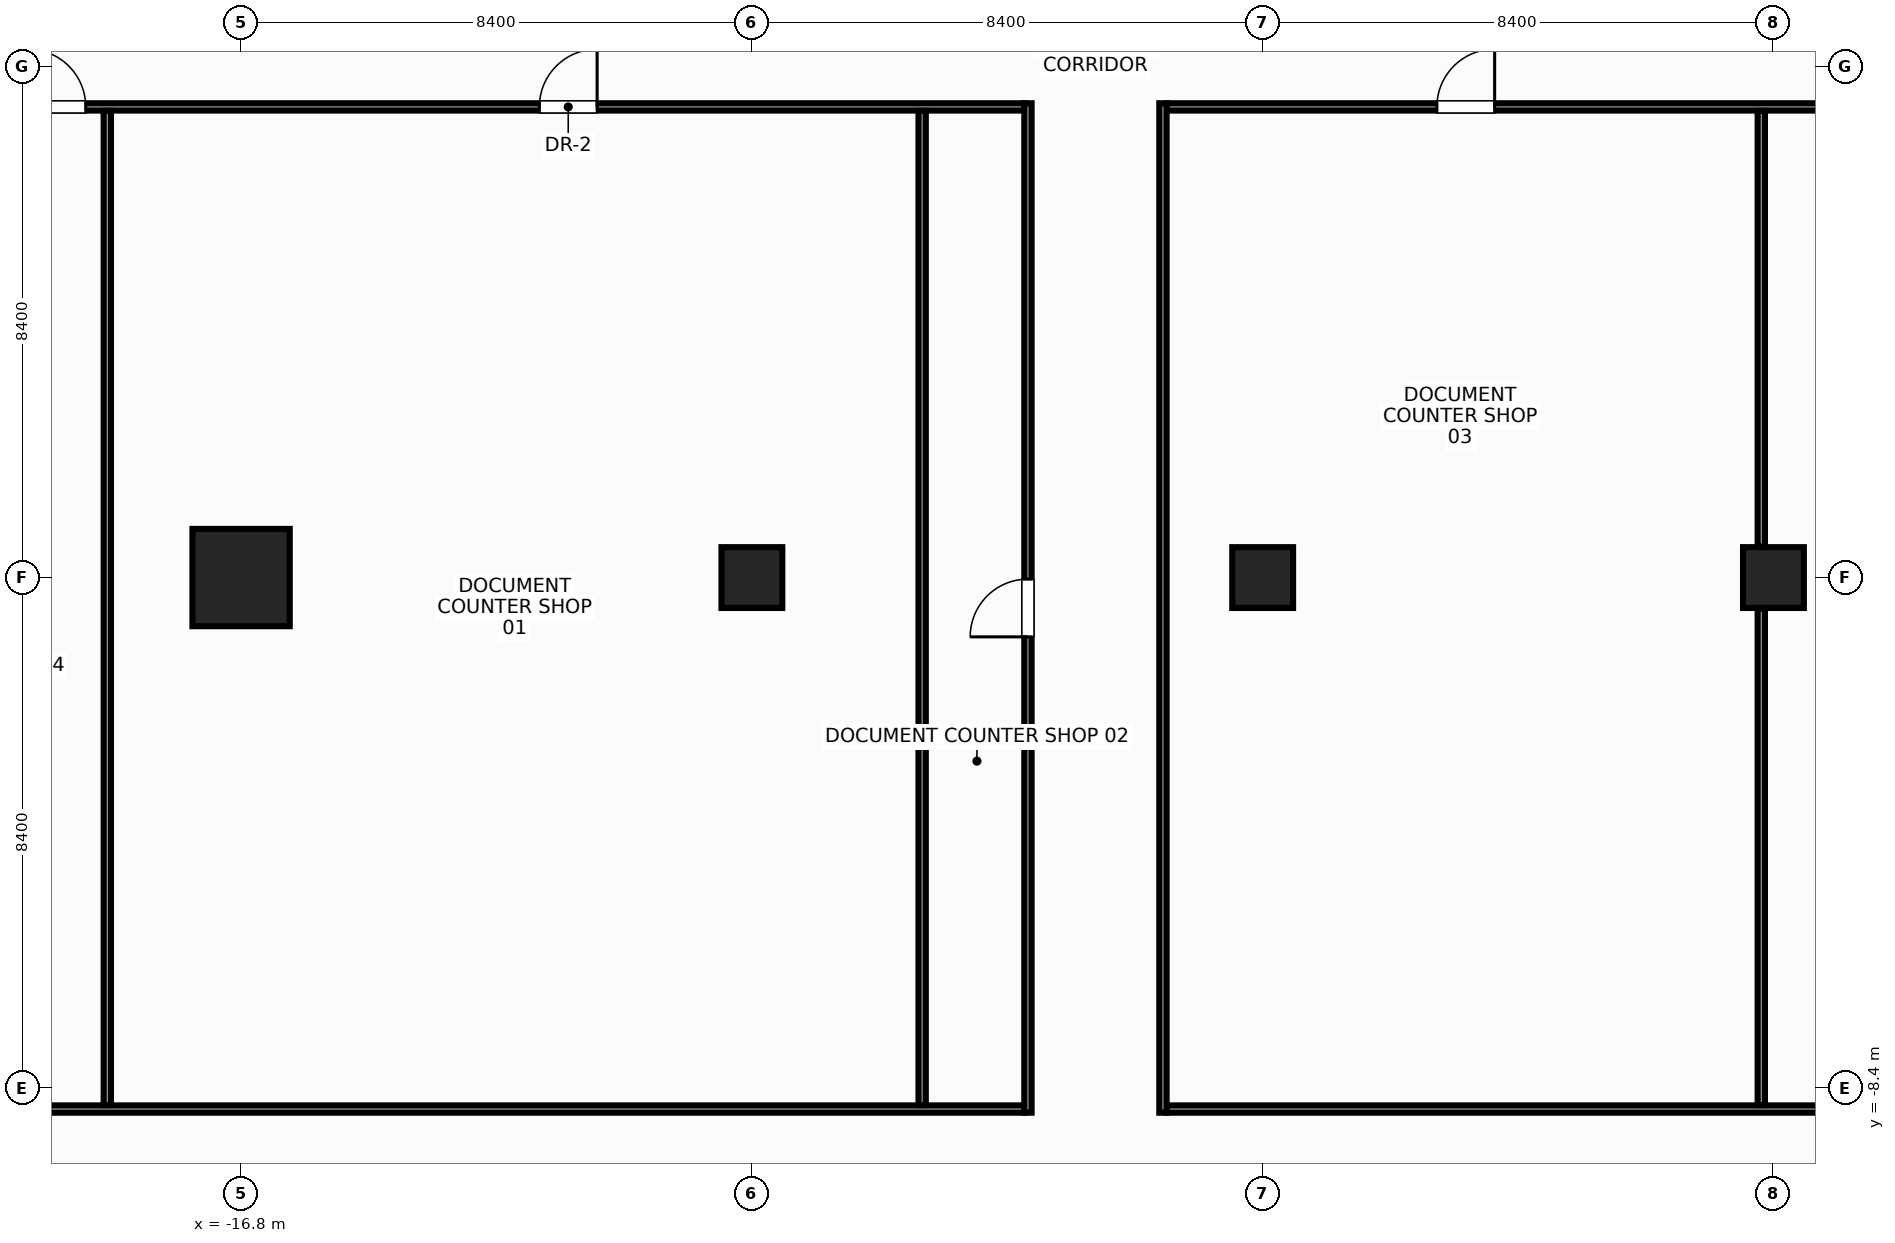
"""IFC4 building model, lengths in metres.
Left out: names, types, materials, properties, quantities, classifications, styles, units other than length and angle.
Written with IfcOpenShell. Run it as: python <this file> out.ifc"""

import sys

from ifc_helpers import new_model, si_unit, direction, frame, frame_2d, origin, origin_with_axes, origin_2d, place, context, subcontext, project, spatial, rectangle, hollow_rectangle, extrude, source, transform, mapped, element, fill, save


model = new_model("IFC4")
c1 = context("Model", 3, precision=1e-05, world=origin(), true_north=direction((0.0, 1.0)))
c2 = subcontext(c1, "Body", "Model", "MODEL_VIEW")
j1 = project(units=[si_unit("LENGTHUNIT", "METRE"), si_unit("PLANEANGLEUNIT", "RADIAN")], contexts=[c1])
p1 = place(None, origin())
s1 = spatial("IfcSite", under=j1, at=p1, CompositionType="ELEMENT")
p2 = place(p1, origin())
s2 = spatial("IfcBuilding", under=s1, at=p2, CompositionType="ELEMENT")
p3 = place(p2, frame((0.0, 0.0, 84.8)))
s3 = spatial("IfcBuildingStorey", under=s2, at=p3, CompositionType="ELEMENT", Elevation=84.8)
m1 = source(origin(), c2, "Body", "SweptSolid", [
    extrude(rectangle(XDim=1.6, YDim=1.6, at=origin_2d()), origin(), (0.0, 0.0, 1.0), 3.6),
])
p4 = place(p3, frame((-16.8, 0.0, 0.0), z_axis=(0.0, 0.0, 1.0), x_axis=(1.0, 0.0, 0.0)))
e1 = element("IfcColumn", 1, at=p4, inside=s3, PredefinedType="COLUMN", context=c2, shape_type="MappedRepresentation", body=[
    mapped(m1, transform((0.0, 0.0, 0.0), x_axis=(1.0, 0.0, 0.0), y_axis=(0.0, 1.0, 0.0), z_axis=(0.0, 0.0, 1.0), scale=1.0)),
])
m2 = source(origin(), c2, "Body", "SweptSolid", [
    extrude(hollow_rectangle(XDim=1.0, YDim=1.0, WallThickness=0.045, at=origin_2d()), origin(), (0.0, 0.0, 1.0), 3.6),
])
for number, where, z_axis, x_axis in (
    (2, (-8.4, 0.0, 0.0), (0.0, 0.0, 1.0), (1.0, 0.0, 0.0)),
    (3, (8.4, 0.0, 0.0), (0.0, 0.0, 1.0), (1.0, 0.0, 0.0)),
):
    element("IfcColumn", number, at=place(p3, frame(where, z_axis=z_axis, x_axis=x_axis)), inside=s3, PredefinedType="COLUMN", context=c2, shape_type="MappedRepresentation", body=[
        mapped(m2, transform((0.0, 0.0, 0.0), x_axis=(1.0, 0.0, 0.0), y_axis=(0.0, 1.0, 0.0), z_axis=(0.0, 0.0, 1.0), scale=1.0)),
    ])
m3 = source(origin(), c2, "Body", "SweptSolid", [
    extrude(rectangle(XDim=1.0, YDim=1.0, at=origin_2d()), origin(), (0.0, 0.0, 1.0), 3.6),
])
p5 = place(p3, origin_with_axes())
e4 = element("IfcColumn", 4, at=p5, inside=s3, PredefinedType="COLUMN", context=c2, shape_type="MappedRepresentation", body=[
    mapped(m3, transform((0.0, 0.0, 0.0), x_axis=(1.0, 0.0, 0.0), y_axis=(0.0, 1.0, 0.0), z_axis=(0.0, 0.0, 1.0), scale=1.0)),
])
m4 = source(origin(), c2, "Body", "SweptSolid", [
    extrude(rectangle(XDim=16.8, YDim=0.12, at=frame_2d((8.4, 0.0))), origin(), (0.0, 0.0, 1.0), 2.745),
])
p6 = place(p3, frame((-20.72, 7.74, 0.0), z_axis=(0.0, 0.0, 1.0), x_axis=(1.0, 0.0, 0.0)))
e5 = element("IfcWall", 5, at=p6, inside=s3, PredefinedType="PARTITIONING", context=c2, shape_type="MappedRepresentation", body=[
    mapped(m4, transform((0.0, 0.0, 0.0), x_axis=(1.0, 0.0, 0.0), y_axis=(0.0, 1.0, 0.0), z_axis=(0.0, 0.0, 1.0), scale=1.0)),
])
p7 = place(p6, frame((8.825, 0.0, 0.0)))
e6 = element("IfcOpeningElement", 6, at=p7, cuts=e5, PredefinedType="OPENING", context=c2, shape_type="SweptSolid", body=[
    extrude(rectangle(XDim=0.95, YDim=2.15, at=frame_2d((0.475, 1.075))), frame((0.0, 0.072, 0.0), z_axis=(0.0, -1.0, 0.0), x_axis=(1.0, 0.0, 0.0)), (0.0, 0.0, 1.0), 0.144),
])
p8 = place(p6, frame((0.415, 0.0, 0.0)))
e7 = element("IfcOpeningElement", 7, at=p8, cuts=e5, PredefinedType="OPENING", context=c2, shape_type="SweptSolid", body=[
    extrude(rectangle(XDim=0.95, YDim=2.15, at=frame_2d((0.475, 1.075))), frame((0.0, 0.072, 0.0), z_axis=(0.0, -1.0, 0.0), x_axis=(1.0, 0.0, 0.0)), (0.0, 0.0, 1.0), 0.144),
])
m5 = source(origin(), c2, "Body", "SweptSolid", [
    extrude(rectangle(XDim=22.3, YDim=0.12, at=frame_2d((11.15, 0.0))), origin(), (0.0, 0.0, 1.0), 2.745),
])
p9 = place(p3, frame((-1.58, 7.74, 0.0), z_axis=(0.0, 0.0, 1.0), x_axis=(1.0, 0.0, 0.0)))
e8 = element("IfcWall", 8, at=p9, inside=s3, PredefinedType="PARTITIONING", context=c2, shape_type="MappedRepresentation", body=[
    mapped(m5, transform((0.0, 0.0, 0.0), x_axis=(1.0, 0.0, 0.0), y_axis=(0.0, 1.0, 0.0), z_axis=(0.0, 0.0, 1.0), scale=1.0)),
])
p10 = place(p9, frame((4.445, 0.0, 0.0)))
e9 = element("IfcOpeningElement", 9, at=p10, cuts=e8, PredefinedType="OPENING", context=c2, shape_type="SweptSolid", body=[
    extrude(rectangle(XDim=0.95, YDim=2.15, at=frame_2d((0.475, 1.075))), frame((0.0, 0.072, 0.0), z_axis=(0.0, -1.0, 0.0), x_axis=(1.0, 0.0, 0.0)), (0.0, 0.0, 1.0), 0.144),
])
p11 = place(p9, frame((15.535, 0.0, 0.0)))
e10 = element("IfcOpeningElement", 10, at=p11, cuts=e8, PredefinedType="OPENING", context=c2, shape_type="SweptSolid", body=[
    extrude(rectangle(XDim=0.95, YDim=2.15, at=frame_2d((0.475, 1.075))), frame((0.0, 0.072, 0.0), z_axis=(0.0, -1.0, 0.0), x_axis=(1.0, 0.0, 0.0)), (0.0, 0.0, 1.0), 0.144),
])
p12 = place(p3, frame((-20.72, -8.74, 0.0), z_axis=(0.0, 0.0, 1.0), x_axis=(1.0, 0.0, 0.0)))
e11 = element("IfcWall", 11, at=p12, inside=s3, PredefinedType="PARTITIONING", context=c2, shape_type="MappedRepresentation", body=[
    mapped(m4, transform((0.0, 0.0, 0.0), x_axis=(1.0, 0.0, 0.0), y_axis=(0.0, 1.0, 0.0), z_axis=(0.0, 0.0, 1.0), scale=1.0)),
])
p13 = place(p3, frame((-1.58, -8.74, 0.0), z_axis=(0.0, 0.0, 1.0), x_axis=(1.0, 0.0, 0.0)))
e12 = element("IfcWall", 12, at=p13, inside=s3, PredefinedType="PARTITIONING", context=c2, shape_type="MappedRepresentation", body=[
    mapped(m5, transform((0.0, 0.0, 0.0), x_axis=(1.0, 0.0, 0.0), y_axis=(0.0, 1.0, 0.0), z_axis=(0.0, 0.0, 1.0), scale=1.0)),
])
m6 = source(origin(), c2, "Body", "SweptSolid", [
    extrude(rectangle(XDim=16.6, YDim=0.12, at=frame_2d((8.3, 0.0))), origin(), (0.0, 0.0, 1.0), 2.645),
])
p14 = place(p3, frame((-3.86, -8.8, 0.0), z_axis=(0.0, 0.0, 1.0), x_axis=(0.0, 1.0, 0.0)))
e13 = element("IfcWall", 13, at=p14, inside=s3, PredefinedType="PARTITIONING", context=c2, shape_type="MappedRepresentation", body=[
    mapped(m6, transform((0.0, 0.0, 0.0), x_axis=(1.0, 0.0, 0.0), y_axis=(0.0, 1.0, 0.0), z_axis=(0.0, 0.0, 1.0), scale=1.0)),
])
p15 = place(p14, frame((7.825, 0.0, 0.0)))
e14 = element("IfcOpeningElement", 14, at=p15, cuts=e13, PredefinedType="OPENING", context=c2, shape_type="SweptSolid", body=[
    extrude(rectangle(XDim=0.95, YDim=2.15, at=frame_2d((0.475, 1.075))), frame((0.0, 0.072, 0.0), z_axis=(0.0, -1.0, 0.0), x_axis=(1.0, 0.0, 0.0)), (0.0, 0.0, 1.0), 0.144),
])
p16 = place(p3, frame((-1.64, -8.8, 0.0), z_axis=(0.0, 0.0, 1.0), x_axis=(0.0, 1.0, 0.0)))
e15 = element("IfcWall", 15, at=p16, inside=s3, PredefinedType="PARTITIONING", context=c2, shape_type="MappedRepresentation", body=[
    mapped(m6, transform((0.0, 0.0, 0.0), x_axis=(1.0, 0.0, 0.0), y_axis=(0.0, 1.0, 0.0), z_axis=(0.0, 0.0, 1.0), scale=1.0)),
])
m7 = source(origin(), c2, "Body", "SweptSolid", [
    extrude(rectangle(XDim=16.35, YDim=0.12, at=frame_2d((8.175, 0.0))), origin(), (0.0, 0.0, 1.0), 2.745),
])
p17 = place(p3, frame((-19.0, -8.675, 0.0), z_axis=(0.0, 0.0, 1.0), x_axis=(0.0, 1.0, 0.0)))
e16 = element("IfcWall", 16, at=p17, inside=s3, PredefinedType="PARTITIONING", context=c2, shape_type="MappedRepresentation", body=[
    mapped(m7, transform((0.0, 0.0, 0.0), x_axis=(1.0, 0.0, 0.0), y_axis=(0.0, 1.0, 0.0), z_axis=(0.0, 0.0, 1.0), scale=1.0)),
])
m8 = source(origin(), c2, "Body", "SweptSolid", [
    extrude(rectangle(XDim=16.35, YDim=0.12, at=frame_2d((8.175, 0.0))), origin(), (0.0, 0.0, 1.0), 2.645),
])
p18 = place(p3, frame((-5.6, -8.675, 0.0), z_axis=(0.0, 0.0, 1.0), x_axis=(0.0, 1.0, 0.0)))
e17 = element("IfcWall", 17, at=p18, inside=s3, PredefinedType="PARTITIONING", context=c2, shape_type="MappedRepresentation", body=[
    mapped(m8, transform((0.0, 0.0, 0.0), x_axis=(1.0, 0.0, 0.0), y_axis=(0.0, 1.0, 0.0), z_axis=(0.0, 0.0, 1.0), scale=1.0)),
])
m9 = source(origin(), c2, "Body", "SweptSolid", [
    extrude(rectangle(XDim=8.165, YDim=0.12, at=frame_2d((4.083, 0.0))), origin(), (0.0, 0.0, 1.0), 2.745),
])
p19 = place(p3, frame((8.2, -8.675, 0.0), z_axis=(0.0, 0.0, 1.0), x_axis=(0.0, 1.0, 0.0)))
e18 = element("IfcWall", 18, at=p19, inside=s3, PredefinedType="PARTITIONING", context=c2, shape_type="MappedRepresentation", body=[
    mapped(m9, transform((0.0, 0.0, 0.0), x_axis=(1.0, 0.0, 0.0), y_axis=(0.0, 1.0, 0.0), z_axis=(0.0, 0.0, 1.0), scale=1.0)),
])
m10 = source(origin(), c2, "Body", "SweptSolid", [
    extrude(rectangle(XDim=7.165, YDim=0.12, at=frame_2d((3.583, 0.0))), origin(), (0.0, 0.0, 1.0), 2.645),
])
p20 = place(p3, frame((8.2, 0.51, 0.0), z_axis=(0.0, 0.0, 1.0), x_axis=(0.0, 1.0, 0.0)))
e19 = element("IfcWall", 19, at=p20, inside=s3, PredefinedType="PARTITIONING", context=c2, shape_type="MappedRepresentation", body=[
    mapped(m10, transform((0.0, 0.0, 0.0), x_axis=(1.0, 0.0, 0.0), y_axis=(0.0, 1.0, 0.0), z_axis=(0.0, 0.0, 1.0), scale=1.0)),
])
m11 = source(origin(), c2, "Body", "SweptSolid", [
    extrude(rectangle(XDim=0.95, YDim=2.15, at=frame_2d((0.475, 1.075))), frame((0.0, 0.025, 0.0), z_axis=(0.0, -1.0, 0.0), x_axis=(1.0, 0.0, 0.0)), (0.0, 0.0, 1.0), 0.05),
])
p21 = place(p7, origin())
e20 = element("IfcDoor", 20, at=p21, inside=s3, OperationType="SINGLE_SWING_RIGHT", PredefinedType="DOOR", context=c2, shape_type="MappedRepresentation", body=[
    mapped(m11, transform((0.0, 0.0, 0.0), x_axis=(1.0, 0.0, 0.0), y_axis=(0.0, 1.0, 0.0), z_axis=(0.0, 0.0, 1.0), scale=1.0)),
])
fill(e6, e20)
p22 = place(p15, origin())
e21 = element("IfcDoor", 21, at=p22, inside=s3, OperationType="SINGLE_SWING_LEFT", PredefinedType="DOOR", context=c2, shape_type="MappedRepresentation", body=[
    mapped(m11, transform((0.0, 0.0, 0.0), x_axis=(1.0, 0.0, 0.0), y_axis=(0.0, 1.0, 0.0), z_axis=(0.0, 0.0, 1.0), scale=1.0)),
])
fill(e14, e21)
p23 = place(p10, origin())
e22 = element("IfcDoor", 22, at=p23, inside=s3, OperationType="SINGLE_SWING_RIGHT", PredefinedType="DOOR", context=c2, shape_type="MappedRepresentation", body=[
    mapped(m11, transform((0.0, 0.0, 0.0), x_axis=(1.0, 0.0, 0.0), y_axis=(0.0, 1.0, 0.0), z_axis=(0.0, 0.0, 1.0), scale=1.0)),
])
fill(e9, e22)
p24 = place(p8, origin())
e23 = element("IfcDoor", 23, at=p24, inside=s3, OperationType="SINGLE_SWING_LEFT", PredefinedType="DOOR", context=c2, shape_type="MappedRepresentation", body=[
    mapped(m11, transform((0.0, 0.0, 0.0), x_axis=(1.0, 0.0, 0.0), y_axis=(0.0, 1.0, 0.0), z_axis=(0.0, 0.0, 1.0), scale=1.0)),
])
fill(e7, e23)
save(model, sys.argv[1])
